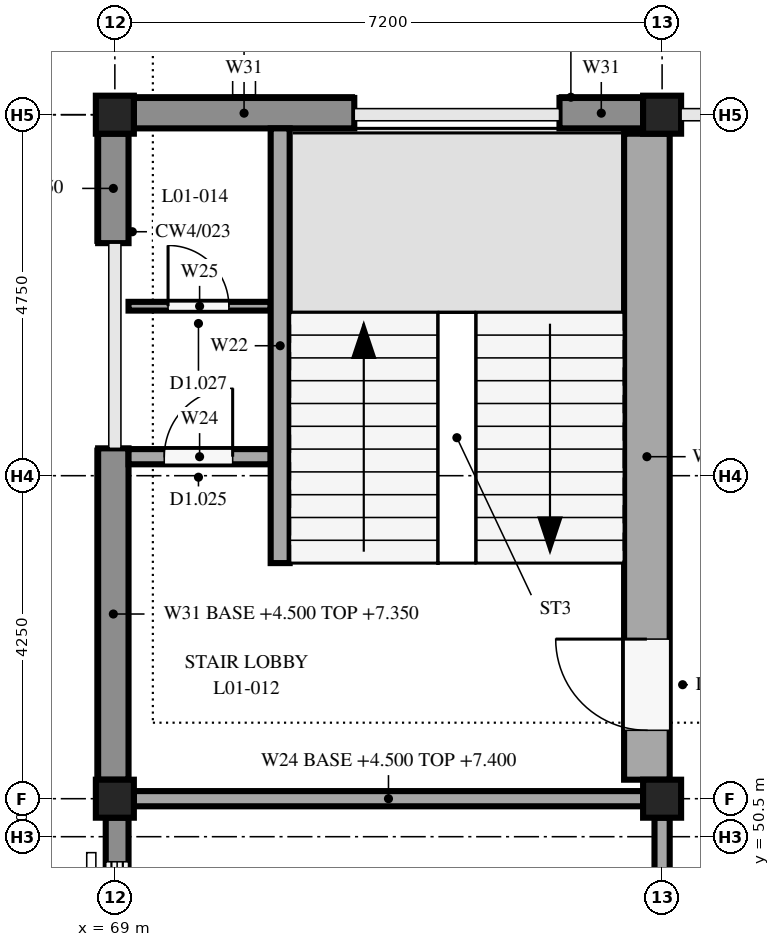
"""IFC4 building model, lengths in metres.
Left out: names, types, materials, properties, quantities, classifications, styles, units other than length and angle.
Written with IfcOpenShell. Run it as: python <this file> out.ifc"""

import sys

from ifc_helpers import new_model, si_unit, direction, frame, frame_2d, origin, origin_2d, place, context, subcontext, project, spatial, rectangle, extrude, element, fill, save


model = new_model("IFC4")
c1 = context("Model", 3, precision=1e-05, world=origin(), true_north=direction((0.0, 1.0)))
c2 = subcontext(c1, "Body", "Model", "MODEL_VIEW")
j1 = project(units=[si_unit("LENGTHUNIT", "METRE"), si_unit("PLANEANGLEUNIT", "RADIAN")], contexts=[c1])
p1 = place(None, origin())
s1 = spatial("IfcSite", under=j1, at=p1, CompositionType="ELEMENT")
p2 = place(p1, origin())
s2 = spatial("IfcBuilding", under=s1, at=p2, CompositionType="ELEMENT")
p3 = place(p2, frame((0.0, 0.0, 4.5)))
s3 = spatial("IfcBuildingStorey", under=s2, at=p3, CompositionType="ELEMENT", Elevation=4.5)
for number, where, z_axis, x_axis in (
    (1, (69.0, 51.0, 0.0), (0.0, 0.0, 1.0), (1.0, 0.0, 0.0)),
    (2, (69.0, 60.0, 0.0), (0.0, 0.0, 1.0), (1.0, 0.0, 0.0)),
    (3, (76.2, 51.0, 0.0), (0.0, 0.0, 1.0), (1.0, 0.0, 0.0)),
    (4, (76.2, 60.0, 0.0), (0.0, 0.0, 1.0), (1.0, 0.0, 0.0)),
):
    element("IfcColumn", number, at=place(p3, frame(where, z_axis=z_axis, x_axis=x_axis)), inside=s3, PredefinedType="COLUMN", context=c2, shape_type="SweptSolid", body=[
        extrude(rectangle(XDim=0.5, YDim=0.5, at=origin_2d()), origin(), (0.0, 0.0, 1.0), 3.35),
    ])
p4 = place(p3, frame((69.03, 42.25, 0.0), z_axis=(0.0, 0.0, 1.0), x_axis=(0.0, 1.0, 0.0)))
e5 = element("IfcWall", 5, at=p4, inside=s3, PredefinedType="STANDARD", context=c2, shape_type="SweptSolid", body=[
    extrude(rectangle(XDim=8.5, YDim=0.3, at=frame_2d((4.25, 0.0))), origin(), (0.0, 0.0, 1.0), 2.85),
])
p5 = place(p4, frame((0.58, 0.0, 0.3)))
e6 = element("IfcOpeningElement", 6, at=p5, cuts=e5, PredefinedType="OPENING", context=c2, shape_type="SweptSolid", body=[
    extrude(rectangle(XDim=1.4, YDim=2.5, at=frame_2d((0.7, 1.25))), frame((0.0, 0.16, 0.0), z_axis=(0.0, -1.0, 0.0), x_axis=(1.0, 0.0, 0.0)), (0.0, 0.0, 1.0), 0.32),
])
p6 = place(p4, frame((2.56, 0.0, 0.3)))
e7 = element("IfcOpeningElement", 7, at=p6, cuts=e5, PredefinedType="OPENING", context=c2, shape_type="SweptSolid", body=[
    extrude(rectangle(XDim=1.4, YDim=2.5, at=frame_2d((0.7, 1.25))), frame((0.0, 0.16, 0.0), z_axis=(0.0, -1.0, 0.0), x_axis=(1.0, 0.0, 0.0)), (0.0, 0.0, 1.0), 0.32),
])
p7 = place(p4, frame((4.54, 0.0, 0.3)))
e8 = element("IfcOpeningElement", 8, at=p7, cuts=e5, PredefinedType="OPENING", context=c2, shape_type="SweptSolid", body=[
    extrude(rectangle(XDim=1.4, YDim=2.5, at=frame_2d((0.7, 1.25))), frame((0.0, 0.16, 0.0), z_axis=(0.0, -1.0, 0.0), x_axis=(1.0, 0.0, 0.0)), (0.0, 0.0, 1.0), 0.32),
])
p8 = place(p4, frame((6.52, 0.0, 0.3)))
e9 = element("IfcOpeningElement", 9, at=p8, cuts=e5, PredefinedType="OPENING", context=c2, shape_type="SweptSolid", body=[
    extrude(rectangle(XDim=1.4, YDim=2.5, at=frame_2d((0.7, 1.25))), frame((0.0, 0.16, 0.0), z_axis=(0.0, -1.0, 0.0), x_axis=(1.0, 0.0, 0.0)), (0.0, 0.0, 1.0), 0.32),
])
p9 = place(p3, frame((68.98, 51.25, 0.0), z_axis=(0.0, 0.0, 1.0), x_axis=(0.0, 1.0, 0.0)))
e10 = element("IfcWall", 10, at=p9, inside=s3, PredefinedType="STANDARD", context=c2, shape_type="SweptSolid", body=[
    extrude(rectangle(XDim=4.36, YDim=0.4, at=frame_2d((2.18, 0.0))), origin(), (0.0, 0.0, 1.0), 2.85),
])
p10 = place(p3, frame((68.98, 58.31, 0.0), z_axis=(0.0, 0.0, 1.0), x_axis=(0.0, 1.0, 0.0)))
e11 = element("IfcWall", 11, at=p10, inside=s3, PredefinedType="STANDARD", context=c2, shape_type="SweptSolid", body=[
    extrude(rectangle(XDim=1.44, YDim=0.4, at=frame_2d((0.72, 0.0))), origin(), (0.0, 0.0, 1.0), 2.85),
])
p11 = place(p3, frame((69.25, 60.02, 0.0), z_axis=(0.0, 0.0, 1.0), x_axis=(1.0, 0.0, 0.0)))
e12 = element("IfcWall", 12, at=p11, inside=s3, PredefinedType="STANDARD", context=c2, shape_type="SweptSolid", body=[
    extrude(rectangle(XDim=2.9, YDim=0.4, at=frame_2d((1.45, 0.0))), origin(), (0.0, 0.0, 1.0), 2.9),
])
p12 = place(p3, frame((74.85, 60.02, 0.0), z_axis=(0.0, 0.0, 1.0), x_axis=(1.0, 0.0, 0.0)))
e13 = element("IfcWall", 13, at=p12, inside=s3, PredefinedType="STANDARD", context=c2, shape_type="SweptSolid", body=[
    extrude(rectangle(XDim=1.1, YDim=0.4, at=frame_2d((0.55, 0.0))), origin(), (0.0, 0.0, 1.0), 2.9),
])
p13 = place(p3, frame((71.175, 54.1, 0.0), z_axis=(0.0, 0.0, 1.0), x_axis=(0.0, 1.0, 0.0)))
e14 = element("IfcWall", 14, at=p13, inside=s3, PredefinedType="SOLIDWALL", context=c2, shape_type="SweptSolid", body=[
    extrude(rectangle(XDim=5.72, YDim=0.25, at=frame_2d((2.86, 0.0))), origin(), (0.0, 0.0, 1.0), 3.35),
])
p14 = place(p3, frame((76.0, 51.25, 0.0), z_axis=(0.0, 0.0, 1.0), x_axis=(0.0, 1.0, 0.0)))
e15 = element("IfcWall", 15, at=p14, inside=s3, PredefinedType="SOLIDWALL", context=c2, shape_type="SweptSolid", body=[
    extrude(rectangle(XDim=8.5, YDim=0.6, at=frame_2d((4.25, 0.0))), origin(), (0.0, 0.0, 1.0), 3.35),
])
p15 = place(p14, frame((0.65, 0.0, 0.0)))
e16 = element("IfcOpeningElement", 16, at=p15, cuts=e15, PredefinedType="OPENING", context=c2, shape_type="SweptSolid", body=[
    extrude(rectangle(XDim=1.2, YDim=2.1, at=frame_2d((0.6, 1.05))), frame((0.0, 0.31, 0.0), z_axis=(0.0, -1.0, 0.0), x_axis=(1.0, 0.0, 0.0)), (0.0, 0.0, 1.0), 0.62),
])
p16 = place(p3, frame((69.18, 55.5, 0.0), z_axis=(0.0, 0.0, 1.0), x_axis=(1.0, 0.0, 0.0)))
e17 = element("IfcWall", 17, at=p16, inside=s3, PredefinedType="SOLIDWALL", context=c2, shape_type="SweptSolid", body=[
    extrude(rectangle(XDim=1.87, YDim=0.2, at=frame_2d((0.935, 0.0))), origin(), (0.0, 0.0, 1.0), 3.35),
])
p17 = place(p16, frame((0.47, 0.0, 0.0)))
e18 = element("IfcOpeningElement", 18, at=p17, cuts=e17, PredefinedType="OPENING", context=c2, shape_type="SweptSolid", body=[
    extrude(rectangle(XDim=0.9, YDim=2.1, at=frame_2d((0.45, 1.05))), frame((0.0, 0.11, 0.0), z_axis=(0.0, -1.0, 0.0), x_axis=(1.0, 0.0, 0.0)), (0.0, 0.0, 1.0), 0.22),
])
p18 = place(p3, frame((69.18, 57.48, 0.0), z_axis=(0.0, 0.0, 1.0), x_axis=(1.0, 0.0, 0.0)))
e19 = element("IfcWall", 19, at=p18, inside=s3, PredefinedType="PARTITIONING", context=c2, shape_type="SweptSolid", body=[
    extrude(rectangle(XDim=1.87, YDim=0.115, at=frame_2d((0.935, 0.0))), origin(), (0.0, 0.0, 1.0), 3.35),
])
p19 = place(p18, frame((0.52, 0.0, 0.0)))
e20 = element("IfcOpeningElement", 20, at=p19, cuts=e19, PredefinedType="OPENING", context=c2, shape_type="SweptSolid", body=[
    extrude(rectangle(XDim=0.8, YDim=2.1, at=frame_2d((0.4, 1.05))), frame((0.0, 0.067, 0.0), z_axis=(0.0, -1.0, 0.0), x_axis=(1.0, 0.0, 0.0)), (0.0, 0.0, 1.0), 0.135),
])
p20 = place(p3, frame((69.25, 51.0, 0.0), z_axis=(0.0, 0.0, 1.0), x_axis=(1.0, 0.0, 0.0)))
e21 = element("IfcWall", 21, at=p20, inside=s3, PredefinedType="SOLIDWALL", context=c2, shape_type="SweptSolid", body=[
    extrude(rectangle(XDim=6.7, YDim=0.2, at=frame_2d((3.35, 0.0))), origin(), (0.0, 0.0, 1.0), 2.9),
])
p21 = place(p3, frame((76.2, 42.25, 0.0), z_axis=(0.0, 0.0, 1.0), x_axis=(0.0, 1.0, 0.0)))
e22 = element("IfcWall", 22, at=p21, inside=s3, PredefinedType="PARTITIONING", context=c2, shape_type="SweptSolid", body=[
    extrude(rectangle(XDim=8.5, YDim=0.2, at=frame_2d((4.25, 0.0))), origin(), (0.0, 0.0, 1.0), 2.9),
])
p22 = place(p21, frame((3.5, 0.0, 0.0)))
e23 = element("IfcOpeningElement", 23, at=p22, cuts=e22, PredefinedType="OPENING", context=c2, shape_type="SweptSolid", body=[
    extrude(rectangle(XDim=1.5, YDim=2.1, at=frame_2d((0.75, 1.05))), frame((0.0, 0.11, 0.0), z_axis=(0.0, -1.0, 0.0), x_axis=(1.0, 0.0, 0.0)), (0.0, 0.0, 1.0), 0.22),
])
p23 = place(p8, origin())
e24 = element("IfcWindow", 24, at=p23, inside=s3, PartitioningType="DOUBLE_PANEL_VERTICAL", PredefinedType="WINDOW", context=c2, shape_type="SweptSolid", body=[
    extrude(rectangle(XDim=1.4, YDim=2.5, at=frame_2d((0.7, 1.25))), frame((0.0, 0.03, 0.0), z_axis=(0.0, -1.0, 0.0), x_axis=(1.0, 0.0, 0.0)), (0.0, 0.0, 1.0), 0.06),
])
fill(e9, e24)
p24 = place(p15, origin())
e25 = element("IfcDoor", 25, at=p24, inside=s3, OperationType="SINGLE_SWING_RIGHT", PredefinedType="DOOR", context=c2, shape_type="SweptSolid", body=[
    extrude(rectangle(XDim=1.2, YDim=2.1, at=frame_2d((0.6, 1.05))), frame((0.0, 0.025, 0.0), z_axis=(0.0, -1.0, 0.0), x_axis=(1.0, 0.0, 0.0)), (0.0, 0.0, 1.0), 0.05),
])
fill(e16, e25)
p25 = place(p17, origin())
e26 = element("IfcDoor", 26, at=p25, inside=s3, OperationType="SINGLE_SWING_RIGHT", PredefinedType="DOOR", context=c2, shape_type="SweptSolid", body=[
    extrude(rectangle(XDim=0.9, YDim=2.1, at=frame_2d((0.45, 1.05))), frame((0.0, 0.025, 0.0), z_axis=(0.0, -1.0, 0.0), x_axis=(1.0, 0.0, 0.0)), (0.0, 0.0, 1.0), 0.05),
])
fill(e18, e26)
p26 = place(p19, origin())
e27 = element("IfcDoor", 27, at=p26, inside=s3, OperationType="SINGLE_SWING_LEFT", PredefinedType="DOOR", context=c2, shape_type="SweptSolid", body=[
    extrude(rectangle(XDim=0.8, YDim=2.1, at=frame_2d((0.4, 1.05))), frame((0.0, 0.025, 0.0), z_axis=(0.0, -1.0, 0.0), x_axis=(1.0, 0.0, 0.0)), (0.0, 0.0, 1.0), 0.05),
])
fill(e20, e27)
save(model, sys.argv[1])
